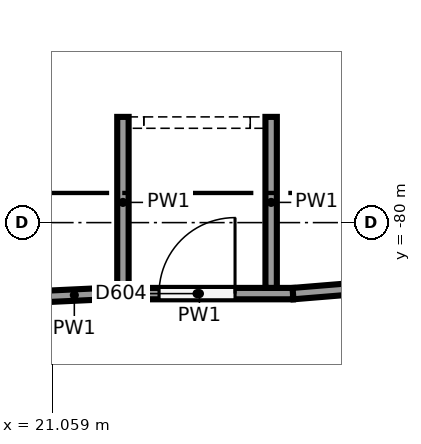
"""IFC4 building model, lengths in metres.
Left out: names, types, materials, properties, quantities, classifications, styles, units other than length and angle.
Written with IfcOpenShell. Run it as: python <this file> out.ifc"""

import sys

from ifc_helpers import new_model, si_unit, direction, frame, frame_2d, origin, place, context, subcontext, project, spatial, rectangle, extrude, element, fill, save


model = new_model("IFC4")
c1 = context("Model", 3, precision=1e-05, world=origin(), true_north=direction((0.0, 1.0)))
c2 = subcontext(c1, "Body", "Model", "MODEL_VIEW")
j1 = project(units=[si_unit("LENGTHUNIT", "METRE"), si_unit("PLANEANGLEUNIT", "RADIAN")], contexts=[c1])
p1 = place(None, origin())
s1 = spatial("IfcSite", under=j1, at=p1, CompositionType="ELEMENT")
p2 = place(p1, origin())
s2 = spatial("IfcBuilding", under=s1, at=p2, CompositionType="ELEMENT")
p3 = place(p2, origin())
s3 = spatial("IfcBuildingStorey", under=s2, at=p3, CompositionType="ELEMENT", Elevation=0.0)
p4 = place(p3, frame((21.23, -85.069, 0.0), z_axis=(0.0, 0.0, 1.0), x_axis=(-0.231637359188, 0.972802206941, 0.0)))
e1 = element("IfcWall", 1, at=p4, inside=s3, PredefinedType="PARTITIONING", context=c2, shape_type="SweptSolid", body=[
    extrude(rectangle(XDim=3.922, YDim=0.15, at=frame_2d((1.961, 0.0))), origin(), (0.0, 0.0, 1.0), 6.15),
])
p5 = place(p3, frame((20.936, -80.973, 0.0), z_axis=(0.0, 0.0, 1.0), x_axis=(0.998905752417, 0.046768555546, 0.0)))
e2 = element("IfcWall", 2, at=p5, inside=s3, PredefinedType="PARTITIONING", context=c2, shape_type="SweptSolid", body=[
    extrude(rectangle(XDim=0.83, YDim=0.15, at=frame_2d((0.415, 0.0))), origin(), (0.0, 0.0, 1.0), 6.15),
])
p6 = place(p3, frame((21.765, -80.934, 0.0), z_axis=(0.0, 0.0, 1.0), x_axis=(1.0, 0.0, 0.0)))
e3 = element("IfcWall", 3, at=p6, inside=s3, PredefinedType="PARTITIONING", context=c2, shape_type="SweptSolid", body=[
    extrude(rectangle(XDim=2.463, YDim=0.15, at=frame_2d((1.231, 0.0))), origin(), (0.0, 0.0, 1.0), 6.15),
])
p7 = place(p6, frame((0.7, 0.0, 0.0)))
e4 = element("IfcOpeningElement", 4, at=p7, cuts=e3, PredefinedType="OPENING", context=c2, shape_type="SweptSolid", body=[
    extrude(rectangle(XDim=1.0, YDim=2.1, at=frame_2d((0.5, 1.05))), frame((0.0, 0.085, 0.0), z_axis=(0.0, -1.0, 0.0), x_axis=(1.0, 0.0, 0.0)), (0.0, 0.0, 1.0), 0.17),
])
p8 = place(p3, frame((24.228, -80.934, 0.0), z_axis=(0.0, 0.0, 1.0), x_axis=(0.996653266277, 0.081745133306, 0.0)))
e5 = element("IfcWall", 5, at=p8, inside=s3, PredefinedType="PARTITIONING", context=c2, shape_type="SweptSolid", body=[
    extrude(rectangle(XDim=3.294, YDim=0.15, at=frame_2d((1.647, 0.0))), origin(), (0.0, 0.0, 1.0), 6.15),
])
for number, where, z_axis, x_axis in (
    (6, (21.99, -80.859, 0.0), (0.0, 0.0, 1.0), (0.0, 1.0, 0.0)),
    (7, (23.94, -80.859, 0.0), (0.0, 0.0, 1.0), (-0.0, 1.0, 0.0)),
):
    element("IfcWall", number, at=place(p3, frame(where, z_axis=z_axis, x_axis=x_axis)), inside=s3, PredefinedType="PARTITIONING", context=c2, shape_type="SweptSolid", body=[
        extrude(rectangle(XDim=2.25, YDim=0.15, at=frame_2d((1.125, 0.0))), origin(), (0.0, 0.0, 1.0), 6.15),
    ])
p9 = place(p3, frame((22.065, -78.684, 0.0), z_axis=(0.0, 0.0, 1.0), x_axis=(1.0, 0.0, 0.0)))
e8 = element("IfcWall", 8, at=p9, inside=s3, PredefinedType="PARTITIONING", context=c2, shape_type="SweptSolid", body=[
    extrude(rectangle(XDim=0.2, YDim=0.15, at=frame_2d((0.1, 0.0))), origin(), (0.0, 0.0, 1.0), 6.15),
])
p10 = place(p3, frame((22.265, -78.684, 0.0), z_axis=(0.0, 0.0, 1.0), x_axis=(1.0, 0.0, 0.0)))
e9 = element("IfcWall", 9, at=p10, inside=s3, PredefinedType="PARTITIONING", context=c2, shape_type="SweptSolid", body=[
    extrude(rectangle(XDim=1.4, YDim=0.15, at=frame_2d((0.7, 0.0))), origin(), (0.0, 0.0, 1.0), 6.15),
])
p11 = place(p10, frame((0.2, 0.0, 0.0)))
e10 = element("IfcOpeningElement", 10, at=p11, cuts=e9, PredefinedType="OPENING", context=c2, shape_type="SweptSolid", body=[
    extrude(rectangle(XDim=1.0, YDim=2.1, at=frame_2d((0.5, 1.05))), frame((0.0, 0.085, 0.0), z_axis=(0.0, -1.0, 0.0), x_axis=(1.0, 0.0, 0.0)), (0.0, 0.0, 1.0), 0.17),
])
p12 = place(p3, frame((23.665, -78.684, 0.0), z_axis=(0.0, 0.0, 1.0), x_axis=(1.0, 0.0, 0.0)))
e11 = element("IfcWall", 11, at=p12, inside=s3, PredefinedType="PARTITIONING", context=c2, shape_type="SweptSolid", body=[
    extrude(rectangle(XDim=0.2, YDim=0.15, at=frame_2d((0.1, 0.0))), origin(), (0.0, 0.0, 1.0), 6.15),
])
p13 = place(p7, origin())
e12 = element("IfcDoor", 12, at=p13, inside=s3, OperationType="SINGLE_SWING_RIGHT", PredefinedType="DOOR", context=c2, shape_type="SweptSolid", body=[
    extrude(rectangle(XDim=1.0, YDim=2.1, at=frame_2d((0.5, 1.05))), frame((0.0, 0.025, 0.0), z_axis=(0.0, -1.0, 0.0), x_axis=(1.0, 0.0, 0.0)), (0.0, 0.0, 1.0), 0.05),
])
fill(e4, e12)
p14 = place(p11, origin())
e13 = element("IfcDoor", 13, at=p14, inside=s3, OperationType="SINGLE_SWING_RIGHT", PredefinedType="DOOR", context=c2, shape_type="SweptSolid", body=[
    extrude(rectangle(XDim=1.0, YDim=2.1, at=frame_2d((0.5, 1.05))), frame((0.0, 0.025, 0.0), z_axis=(0.0, -1.0, 0.0), x_axis=(1.0, 0.0, 0.0)), (0.0, 0.0, 1.0), 0.05),
])
fill(e10, e13)
save(model, sys.argv[1])
